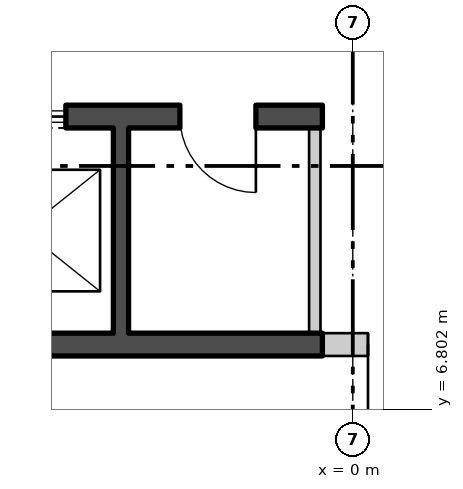
"""IFC4 building model, lengths in metres.
Left out: names, types, materials, properties, quantities, classifications, styles, units other than length and angle.
Written with IfcOpenShell. Run it as: python <this file> out.ifc"""

import sys

from ifc_helpers import new_model, si_unit, direction, frame, frame_2d, origin, place, context, subcontext, project, spatial, polyline, rectangle, outline, extrude, element, fill, save


model = new_model("IFC4")
c1 = context("Model", 3, precision=1e-05, world=origin(), true_north=direction((0.0, 1.0)))
c2 = subcontext(c1, "Body", "Model", "MODEL_VIEW")
j1 = project(units=[si_unit("LENGTHUNIT", "METRE"), si_unit("PLANEANGLEUNIT", "RADIAN")], contexts=[c1])
p1 = place(None, origin())
s1 = spatial("IfcSite", under=j1, at=p1, CompositionType="ELEMENT")
p2 = place(p1, origin())
s2 = spatial("IfcBuilding", under=s1, at=p2, CompositionType="ELEMENT")
p3 = place(p2, frame((0.0, 0.0, 304.2)))
s3 = spatial("IfcBuildingStorey", under=s2, at=p3, CompositionType="ELEMENT", Elevation=304.2)
p4 = place(p3, frame((-25.095, 16.112, -0.18), z_axis=(0.0, 0.0, 1.0), x_axis=(0.500000141277, -0.866025322218, 0.0)))
e1 = element("IfcWall", 1, at=p4, inside=s3, PredefinedType="SOLIDWALL", context=c2, shape_type="SweptSolid", body=[
    extrude(outline(polyline([(-0.13, -0.225), (45.86, -0.225), (45.6, 0.225), (0.13, 0.225), (-0.13, -0.225)])), origin(), (0.0, 0.0, 1.0), 3.98),
])
p5 = place(p4, frame((1.424, 0.0, 1.08)))
e2 = element("IfcOpeningElement", 2, at=p5, cuts=e1, PredefinedType="OPENING", context=c2, shape_type="SweptSolid", body=[
    extrude(rectangle(XDim=2.4, YDim=2.3, at=frame_2d((1.2, 1.15))), frame((0.0, 0.235, 0.0), z_axis=(0.0, -1.0, 0.0), x_axis=(1.0, 0.0, 0.0)), (0.0, 0.0, 1.0), 0.47),
])
p6 = place(p4, frame((5.892, 0.0, 1.08)))
e3 = element("IfcOpeningElement", 3, at=p6, cuts=e1, PredefinedType="OPENING", context=c2, shape_type="SweptSolid", body=[
    extrude(rectangle(XDim=2.4, YDim=2.3, at=frame_2d((1.2, 1.15))), frame((0.0, 0.235, 0.0), z_axis=(0.0, -1.0, 0.0), x_axis=(1.0, 0.0, 0.0)), (0.0, 0.0, 1.0), 0.47),
])
p7 = place(p4, frame((10.399, 0.0, 1.08)))
e4 = element("IfcOpeningElement", 4, at=p7, cuts=e1, PredefinedType="OPENING", context=c2, shape_type="SweptSolid", body=[
    extrude(rectangle(XDim=2.4, YDim=2.3, at=frame_2d((1.2, 1.15))), frame((0.0, 0.235, 0.0), z_axis=(0.0, -1.0, 0.0), x_axis=(1.0, 0.0, 0.0)), (0.0, 0.0, 1.0), 0.47),
])
p8 = place(p4, frame((14.905, 0.0, 1.08)))
e5 = element("IfcOpeningElement", 5, at=p8, cuts=e1, PredefinedType="OPENING", context=c2, shape_type="SweptSolid", body=[
    extrude(rectangle(XDim=2.4, YDim=2.3, at=frame_2d((1.2, 1.15))), frame((0.0, 0.235, 0.0), z_axis=(0.0, -1.0, 0.0), x_axis=(1.0, 0.0, 0.0)), (0.0, 0.0, 1.0), 0.47),
])
p9 = place(p4, frame((19.412, 0.0, 1.08)))
e6 = element("IfcOpeningElement", 6, at=p9, cuts=e1, PredefinedType="OPENING", context=c2, shape_type="SweptSolid", body=[
    extrude(rectangle(XDim=2.4, YDim=2.3, at=frame_2d((1.2, 1.15))), frame((0.0, 0.235, 0.0), z_axis=(0.0, -1.0, 0.0), x_axis=(1.0, 0.0, 0.0)), (0.0, 0.0, 1.0), 0.47),
])
p10 = place(p4, frame((28.425, 0.0, 1.08)))
e7 = element("IfcOpeningElement", 7, at=p10, cuts=e1, PredefinedType="OPENING", context=c2, shape_type="SweptSolid", body=[
    extrude(rectangle(XDim=2.4, YDim=2.3, at=frame_2d((1.2, 1.15))), frame((0.0, 0.235, 0.0), z_axis=(0.0, -1.0, 0.0), x_axis=(1.0, 0.0, 0.0)), (0.0, 0.0, 1.0), 0.47),
])
p11 = place(p4, frame((32.932, 0.0, 1.08)))
e8 = element("IfcOpeningElement", 8, at=p11, cuts=e1, PredefinedType="OPENING", context=c2, shape_type="SweptSolid", body=[
    extrude(rectangle(XDim=2.4, YDim=2.3, at=frame_2d((1.2, 1.15))), frame((0.0, 0.235, 0.0), z_axis=(0.0, -1.0, 0.0), x_axis=(1.0, 0.0, 0.0)), (0.0, 0.0, 1.0), 0.47),
])
p12 = place(p4, frame((37.438, 0.0, 1.08)))
e9 = element("IfcOpeningElement", 9, at=p12, cuts=e1, PredefinedType="OPENING", context=c2, shape_type="SweptSolid", body=[
    extrude(rectangle(XDim=2.4, YDim=2.3, at=frame_2d((1.2, 1.15))), frame((0.0, 0.235, 0.0), z_axis=(0.0, -1.0, 0.0), x_axis=(1.0, 0.0, 0.0)), (0.0, 0.0, 1.0), 0.47),
])
p13 = place(p4, frame((41.907, 0.0, 1.08)))
e10 = element("IfcOpeningElement", 10, at=p13, cuts=e1, PredefinedType="OPENING", context=c2, shape_type="SweptSolid", body=[
    extrude(rectangle(XDim=2.4, YDim=2.3, at=frame_2d((1.2, 1.15))), frame((0.0, 0.235, 0.0), z_axis=(0.0, -1.0, 0.0), x_axis=(1.0, 0.0, 0.0)), (0.0, 0.0, 1.0), 0.47),
])
p14 = place(p3, frame((-10.7, 10.65, 0.0), z_axis=(0.0, 0.0, 1.0), x_axis=(1.0, 0.0, 0.0)))
e11 = element("IfcWall", 11, at=p14, inside=s3, PredefinedType="SHEAR", context=c2, shape_type="SweptSolid", body=[
    extrude(rectangle(XDim=10.3, YDim=0.3, at=frame_2d((5.15, 0.0))), origin(), (0.0, 0.0, 1.0), 4.0),
])
p15 = place(p14, frame((0.675, 0.0, 0.0)))
e12 = element("IfcOpeningElement", 12, at=p15, cuts=e11, PredefinedType="OPENING", context=c2, shape_type="SweptSolid", body=[
    extrude(rectangle(XDim=1.1, YDim=2.1, at=frame_2d((0.55, 1.05))), frame((0.0, 0.16, 0.0), z_axis=(0.0, -1.0, 0.0), x_axis=(1.0, 0.0, 0.0)), (0.0, 0.0, 1.0), 0.32),
])
p16 = place(p14, frame((3.275, 0.0, 0.0)))
e13 = element("IfcOpeningElement", 13, at=p16, cuts=e11, PredefinedType="OPENING", context=c2, shape_type="SweptSolid", body=[
    extrude(rectangle(XDim=1.1, YDim=2.1, at=frame_2d((0.55, 1.05))), frame((0.0, 0.16, 0.0), z_axis=(0.0, -1.0, 0.0), x_axis=(1.0, 0.0, 0.0)), (0.0, 0.0, 1.0), 0.32),
])
p17 = place(p14, frame((5.825, 0.0, 0.0)))
e14 = element("IfcOpeningElement", 14, at=p17, cuts=e11, PredefinedType="OPENING", context=c2, shape_type="SweptSolid", body=[
    extrude(rectangle(XDim=1.1, YDim=2.1, at=frame_2d((0.55, 1.05))), frame((0.0, 0.16, 0.0), z_axis=(0.0, -1.0, 0.0), x_axis=(1.0, 0.0, 0.0)), (0.0, 0.0, 1.0), 0.32),
])
p18 = place(p14, frame((8.425, 0.0, 0.0)))
e15 = element("IfcOpeningElement", 15, at=p18, cuts=e11, PredefinedType="OPENING", context=c2, shape_type="SweptSolid", body=[
    extrude(rectangle(XDim=1.0, YDim=2.1, at=frame_2d((0.5, 1.05))), frame((0.0, 0.16, 0.0), z_axis=(0.0, -1.0, 0.0), x_axis=(1.0, 0.0, 0.0)), (0.0, 0.0, 1.0), 0.32),
])
p19 = place(p3, frame((-10.7, 7.65, 0.0), z_axis=(0.0, 0.0, 1.0), x_axis=(1.0, 0.0, 0.0)))
e16 = element("IfcWall", 16, at=p19, inside=s3, PredefinedType="SHEAR", context=c2, shape_type="SweptSolid", body=[
    extrude(rectangle(XDim=10.3, YDim=0.3, at=frame_2d((5.15, 0.0))), origin(), (0.0, 0.0, 1.0), 4.0),
])
p20 = place(p3, frame((-3.05, 7.8, 0.0), z_axis=(0.0, 0.0, 1.0), x_axis=(0.0, 1.0, 0.0)))
e17 = element("IfcWall", 17, at=p20, inside=s3, PredefinedType="SHEAR", context=c2, shape_type="SweptSolid", body=[
    extrude(rectangle(XDim=2.7, YDim=0.2, at=frame_2d((1.35, 0.0))), origin(), (0.0, 0.0, 1.0), 4.0),
])
p21 = place(p3, frame((-0.5, 7.8, 0.0), z_axis=(0.0, 0.0, 1.0), x_axis=(0.0, 1.0, 0.0)))
e18 = element("IfcWall", 18, at=p21, inside=s3, PredefinedType="PARTITIONING", context=c2, shape_type="SweptSolid", body=[
    extrude(rectangle(XDim=2.7, YDim=0.15, at=frame_2d((1.35, 0.0))), origin(), (0.0, 0.0, 1.0), 4.0),
])
p22 = place(p3, frame((-0.4, 7.65, 0.0), z_axis=(0.0, 0.0, 1.0), x_axis=(1.0, 0.0, 0.0)))
e19 = element("IfcWall", 19, at=p22, inside=s3, PredefinedType="PARTITIONING", context=c2, shape_type="SweptSolid", body=[
    extrude(rectangle(XDim=3.0, YDim=0.3, at=frame_2d((1.5, 0.0))), origin(), (0.0, 0.0, 1.0), 4.0),
])
p23 = place(p22, frame((0.6, 0.0, 0.0)))
e20 = element("IfcOpeningElement", 20, at=p23, cuts=e19, PredefinedType="OPENING", context=c2, shape_type="SweptSolid", body=[
    extrude(rectangle(XDim=1.8, YDim=2.4, at=frame_2d((0.9, 1.2))), frame((0.0, 0.16, 0.0), z_axis=(0.0, -1.0, 0.0), x_axis=(1.0, 0.0, 0.0)), (0.0, 0.0, 1.0), 0.32),
])
p24 = place(p17, origin())
e21 = element("IfcDoor", 21, at=p24, inside=s3, OperationType="SLIDING_TO_LEFT", PredefinedType="DOOR", context=c2, shape_type="SweptSolid", body=[
    extrude(rectangle(XDim=1.1, YDim=2.1, at=frame_2d((0.55, 1.05))), frame((0.0, 0.025, 0.0), z_axis=(0.0, -1.0, 0.0), x_axis=(1.0, 0.0, 0.0)), (0.0, 0.0, 1.0), 0.05),
])
fill(e14, e21)
p25 = place(p18, origin())
e22 = element("IfcDoor", 22, at=p25, inside=s3, OperationType="SINGLE_SWING_RIGHT", PredefinedType="DOOR", context=c2, shape_type="SweptSolid", body=[
    extrude(rectangle(XDim=1.0, YDim=2.1, at=frame_2d((0.5, 1.05))), frame((0.0, 0.025, 0.0), z_axis=(0.0, -1.0, 0.0), x_axis=(1.0, 0.0, 0.0)), (0.0, 0.0, 1.0), 0.05),
])
fill(e15, e22)
p26 = place(p23, origin())
e23 = element("IfcDoor", 23, at=p26, inside=s3, OperationType="DOUBLE_DOOR_SINGLE_SWING", PredefinedType="DOOR", context=c2, shape_type="SweptSolid", body=[
    extrude(rectangle(XDim=1.8, YDim=2.4, at=frame_2d((0.9, 1.2))), frame((0.0, 0.025, 0.0), z_axis=(0.0, -1.0, 0.0), x_axis=(1.0, 0.0, 0.0)), (0.0, 0.0, 1.0), 0.05),
])
fill(e20, e23)
save(model, sys.argv[1])
